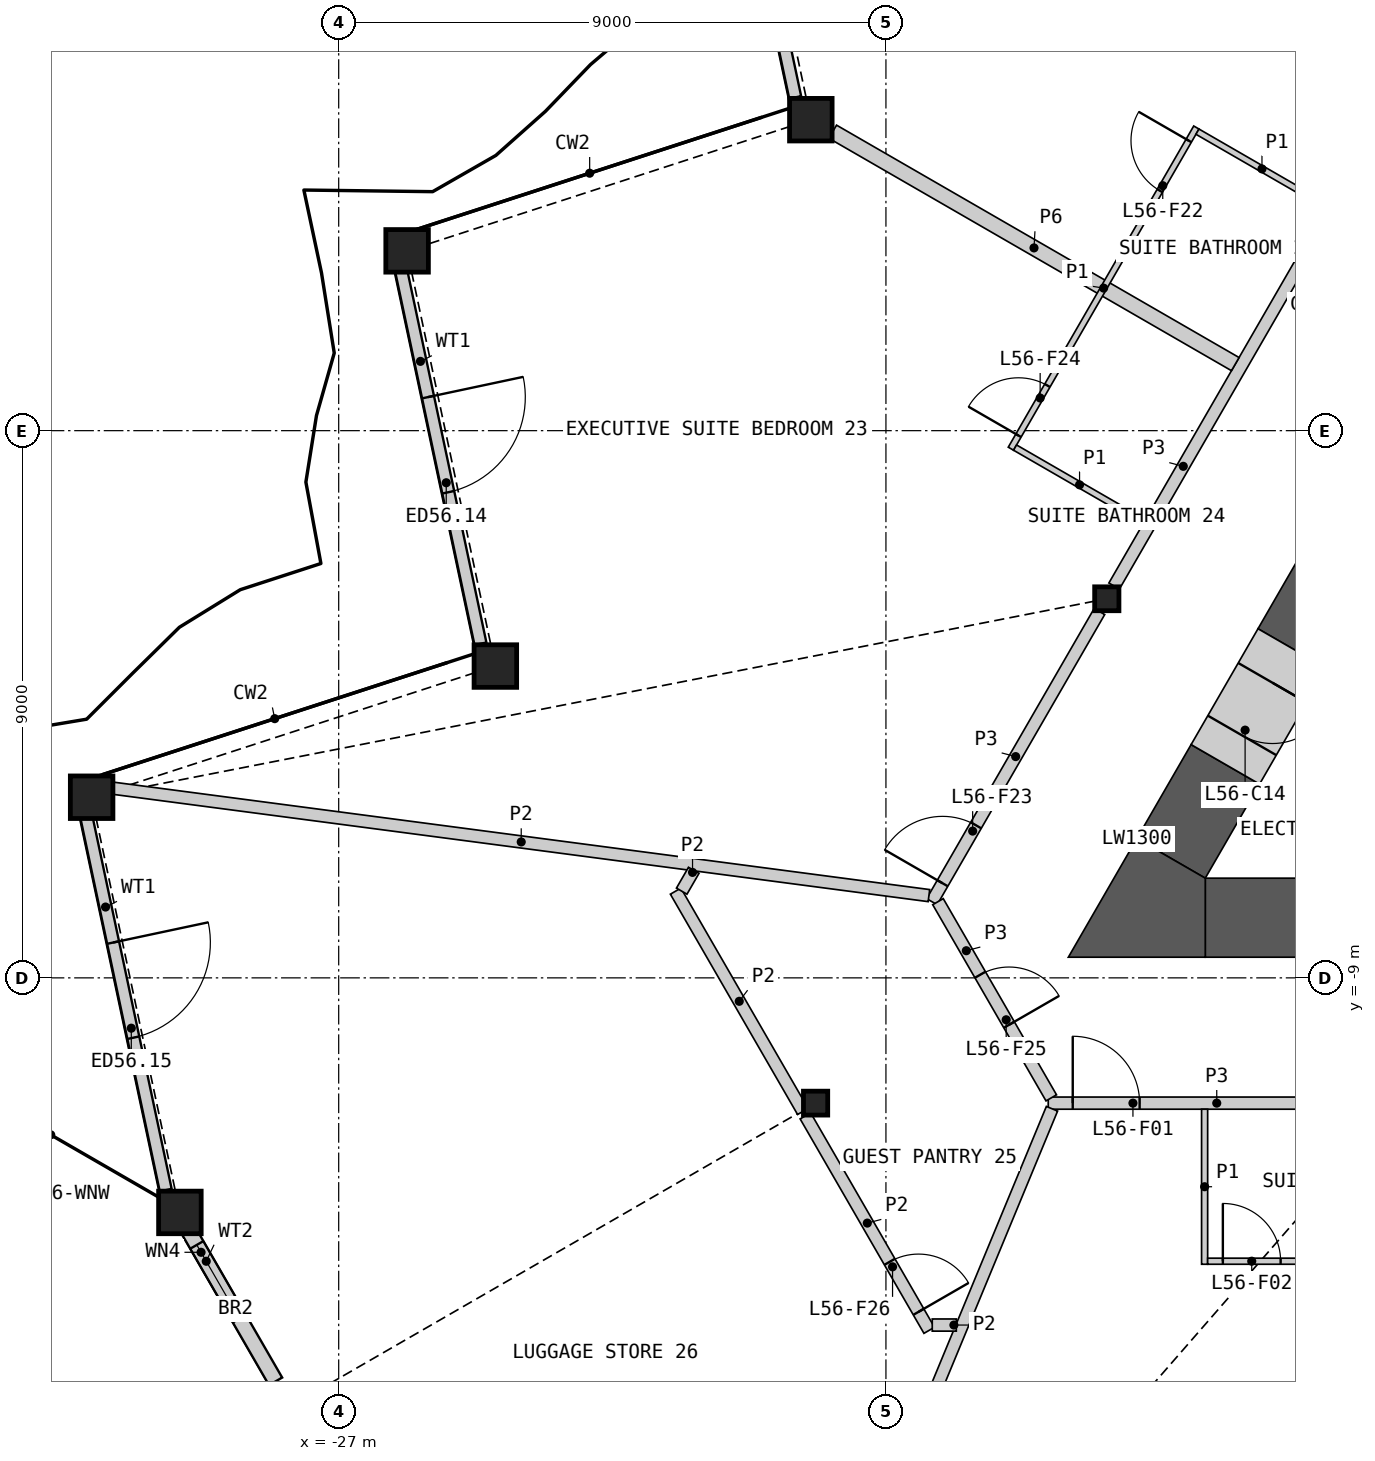
"""IFC4 building model, lengths in metres.
Left out: names, types, materials, properties, quantities, classifications, styles, units other than length and angle.
Written with IfcOpenShell. Run it as: python <this file> out.ifc"""

import sys

from ifc_helpers import new_model, si_unit, direction, frame, frame_2d, origin, origin_2d, place, context, subcontext, project, spatial, polyline, rectangle, hollow_rectangle, i_section, outline, extrude, element, fill, save


model = new_model("IFC4")
c1 = context("Model", 3, precision=1e-05, world=origin(), true_north=direction((0.0, 1.0)))
c2 = subcontext(c1, "Body", "Model", "MODEL_VIEW")
j1 = project(units=[si_unit("LENGTHUNIT", "METRE"), si_unit("PLANEANGLEUNIT", "RADIAN")], contexts=[c1])
p1 = place(None, origin())
s1 = spatial("IfcSite", under=j1, at=p1, CompositionType="ELEMENT")
p2 = place(p1, origin())
s2 = spatial("IfcBuilding", under=s1, at=p2, CompositionType="ELEMENT")
p3 = place(p2, frame((0.0, 0.0, 252.6)))
s3 = spatial("IfcBuildingStorey", under=s2, at=p3, CompositionType="ELEMENT", Elevation=252.6)
for number, where, z_axis, x_axis in (
    (1, (-19.235, 5.115, 0.0), (0.0, 0.0, 1.0), (1.0, 0.0, 0.0)),
    (2, (-25.875, 2.957, 0.0), (0.0, 0.0, 1.0), (1.0, 0.0, 0.0)),
    (3, (-24.423, -3.872, 0.0), (0.0, 0.0, 1.0), (1.0, 0.0, 0.0)),
    (4, (-31.063, -6.029, 0.0), (0.0, 0.0, 1.0), (1.0, 0.0, 0.0)),
    (5, (-29.612, -12.858, 0.0), (0.0, 0.0, 1.0), (1.0, 0.0, 0.0)),
):
    element("IfcColumn", number, at=place(p3, frame(where, z_axis=z_axis, x_axis=x_axis)), inside=s3, PredefinedType="COLUMN", context=c2, shape_type="SweptSolid", body=[
        extrude(hollow_rectangle(XDim=0.7, YDim=0.7, WallThickness=0.045, at=origin_2d()), origin(), (0.0, 0.0, 1.0), 3.6),
    ])
for number, where, z_axis, x_axis in (
    (6, (-14.368, -2.765, 0.0), (0.0, 0.0, 1.0), (1.0, 0.0, 0.0)),
    (7, (-19.157, -11.06, 0.0), (0.0, 0.0, 1.0), (1.0, 0.0, 0.0)),
):
    element("IfcColumn", number, at=place(p3, frame(where, z_axis=z_axis, x_axis=x_axis)), inside=s3, PredefinedType="COLUMN", context=c2, shape_type="SweptSolid", body=[
        extrude(i_section(OverallWidth=0.399, OverallDepth=0.393, WebThickness=0.023, FlangeThickness=0.037, at=origin_2d()), origin(), (0.0, 0.0, 1.0), 3.6),
    ])
p4 = place(p3, frame((-20.805, 11.659, 0.0), z_axis=(0.0, 0.0, 1.0), x_axis=(0.207913305093, -0.978147257608, 0.0)))
e8 = element("IfcWall", 8, at=p4, inside=s3, PredefinedType="SOLIDWALL", context=c2, shape_type="SweptSolid", body=[
    extrude(rectangle(XDim=6.316, YDim=0.2, at=frame_2d((3.158, 0.0))), origin(), (0.0, 0.0, 1.0), 2.701),
])
p5 = place(p4, frame((2.184, 0.0, 0.0)))
e9 = element("IfcOpeningElement", 9, at=p5, cuts=e8, PredefinedType="OPENING", context=c2, shape_type="SweptSolid", body=[
    extrude(rectangle(XDim=1.6, YDim=2.4, at=frame_2d((0.8, 1.2))), frame((0.0, 0.11, 0.0), z_axis=(0.0, -1.0, 0.0), x_axis=(1.0, 0.0, 0.0)), (0.0, 0.0, 1.0), 0.22),
])
p6 = place(p3, frame((-25.985, 2.688, 0.0), z_axis=(0.0, 0.0, 1.0), x_axis=(0.207906715746, -0.978148658205, 0.0)))
e10 = element("IfcWall", 10, at=p6, inside=s3, PredefinedType="SOLIDWALL", context=c2, shape_type="SweptSolid", body=[
    extrude(rectangle(XDim=6.332, YDim=0.2, at=frame_2d((3.166, 0.0))), origin(), (0.0, 0.0, 1.0), 2.701),
])
p7 = place(p6, frame((2.184, 0.0, 0.0)))
e11 = element("IfcOpeningElement", 11, at=p7, cuts=e10, PredefinedType="OPENING", context=c2, shape_type="SweptSolid", body=[
    extrude(rectangle(XDim=1.6, YDim=2.4, at=frame_2d((0.8, 1.2))), frame((0.0, 0.11, 0.0), z_axis=(0.0, -1.0, 0.0), x_axis=(1.0, 0.0, 0.0)), (0.0, 0.0, 1.0), 0.22),
])
p8 = place(p3, frame((-31.164, -6.283, 0.0), z_axis=(0.0, 0.0, 1.0), x_axis=(0.207900158502, -0.978150051932, 0.0)))
e12 = element("IfcWall", 12, at=p8, inside=s3, PredefinedType="SOLIDWALL", context=c2, shape_type="SweptSolid", body=[
    extrude(rectangle(XDim=6.347, YDim=0.2, at=frame_2d((3.174, 0.0))), origin(), (0.0, 0.0, 1.0), 2.701),
])
p9 = place(p8, frame((2.184, 0.0, 0.0)))
e13 = element("IfcOpeningElement", 13, at=p9, cuts=e12, PredefinedType="OPENING", context=c2, shape_type="SweptSolid", body=[
    extrude(rectangle(XDim=1.6, YDim=2.4, at=frame_2d((0.8, 1.2))), frame((0.0, 0.11, 0.0), z_axis=(0.0, -1.0, 0.0), x_axis=(1.0, 0.0, 0.0)), (0.0, 0.0, 1.0), 0.22),
])
p10 = place(p3, frame((-29.559, -13.002, 0.0), z_axis=(0.0, 0.0, 1.0), x_axis=(0.500023511883, -0.866011828767, 0.0)))
e14 = element("IfcWall", 14, at=p10, inside=s3, PredefinedType="SOLIDWALL", context=c2, shape_type="SweptSolid", body=[
    extrude(rectangle(XDim=3.042, YDim=0.25, at=frame_2d((1.521, 0.0))), origin(), (0.0, 0.0, 1.0), 2.701),
])
p11 = place(p10, frame((0.45, 0.0, 1.8)))
e15 = element("IfcOpeningElement", 15, at=p11, cuts=e14, PredefinedType="OPENING", context=c2, shape_type="SweptSolid", body=[
    extrude(rectangle(XDim=1.4, YDim=0.7, at=frame_2d((0.7, 0.35))), frame((0.0, 0.135, 0.0), z_axis=(0.0, -1.0, 0.0), x_axis=(1.0, 0.0, 0.0)), (0.0, 0.0, 1.0), 0.27),
])
p12 = place(p3, frame((-12.748, -8.01, 0.0), z_axis=(0.0, 0.0, 1.0), x_axis=(1.0, 0.0, 0.0)))
e16 = element("IfcWall", 16, at=p12, inside=s3, PredefinedType="SHEAR", context=c2, shape_type="SweptSolid", body=[
    extrude(rectangle(XDim=25.497, YDim=1.3, at=frame_2d((12.748, 0.0))), origin(), (0.0, 0.0, 1.0), 3.25),
])
p13 = place(p3, frame((-9.137, 0.195, 0.0), z_axis=(0.0, 0.0, 1.0), x_axis=(-0.499985697398, -0.866033661238, 0.0)))
e17 = element("IfcWall", 17, at=p13, inside=s3, PredefinedType="SHEAR", context=c2, shape_type="SweptSolid", body=[
    extrude(rectangle(XDim=4.362, YDim=1.3, at=frame_2d((2.181, 0.0))), origin(), (0.0, 0.0, 1.0), 3.25),
])
p14 = place(p3, frame((-12.418, -5.488, 0.0), z_axis=(0.0, 0.0, 1.0), x_axis=(-0.499931460552, -0.866064971437, 0.0)))
e18 = element("IfcWall", 18, at=p14, inside=s3, PredefinedType="SHEAR", context=c2, shape_type="SweptSolid", body=[
    extrude(rectangle(XDim=1.786, YDim=1.3, at=frame_2d((0.893, 0.0))), origin(), (0.0, 0.0, 1.0), 3.25),
])
p15 = place(p3, origin())
e19 = element("IfcWall", 19, at=p15, inside=s3, PredefinedType="SHEAR", context=c2, shape_type="SweptSolid", body=[
    extrude(outline(polyline([(-13.874, -6.71), (-12.748, -7.36), (-12.748, -8.66), (-15.0, -8.66), (-13.874, -6.71)])), origin(), (0.0, 0.0, 1.0), 3.25),
])
p16 = place(p3, frame((-11.318, -3.583, 0.0), z_axis=(0.0, 0.0, 1.0), x_axis=(-0.50002983664, -0.866008176907, 0.0)))
e20 = element("IfcWall", 20, at=p16, inside=s3, PredefinedType="SHEAR", context=c2, shape_type="SweptSolid", body=[
    extrude(rectangle(XDim=2.2, YDim=1.3, at=frame_2d((1.1, 0.0))), origin(), (0.0, 0.0, 1.0), 3.25),
])
p17 = place(p16, frame((0.65, 0.0, 0.0)))
e21 = element("IfcOpeningElement", 21, at=p17, cuts=e20, PredefinedType="OPENING", context=c2, shape_type="SweptSolid", body=[
    extrude(rectangle(XDim=1.0, YDim=2.1, at=frame_2d((0.5, 1.05))), frame((0.0, 0.66, 0.0), z_axis=(0.0, -1.0, 0.0), x_axis=(1.0, 0.0, 0.0)), (0.0, 0.0, 1.0), 1.32),
])
p18 = place(p3, frame((-14.247, -2.556, 0.0), z_axis=(0.0, 0.0, 1.0), x_axis=(0.49998193945, 0.866035830797, 0.0)))
e22 = element("IfcWall", 22, at=p18, inside=s3, PredefinedType="PARTITIONING", context=c2, shape_type="SweptSolid", body=[
    extrude(rectangle(XDim=9.094, YDim=0.2, at=frame_2d((4.547, 0.0))), origin(), (0.0, 0.0, 1.0), 3.25),
])
p19 = place(p3, frame((-18.875, 4.917, 0.0), z_axis=(0.0, 0.0, 1.0), x_axis=(0.866017519557, -0.500013655634, 0.0)))
e23 = element("IfcWall", 23, at=p19, inside=s3, PredefinedType="PARTITIONING", context=c2, shape_type="SweptSolid", body=[
    extrude(rectangle(XDim=7.644, YDim=0.25, at=frame_2d((3.822, 0.0))), origin(), (0.0, 0.0, 1.0), 2.404),
])
p20 = place(p3, frame((-15.331, -11.06, 0.0), z_axis=(0.0, 0.0, 1.0), x_axis=(1.0, 0.0, 0.0)))
e24 = element("IfcWall", 24, at=p20, inside=s3, PredefinedType="PARTITIONING", context=c2, shape_type="SweptSolid", body=[
    extrude(rectangle(XDim=5.543, YDim=0.2, at=frame_2d((2.771, 0.0))), origin(), (0.0, 0.0, 1.0), 3.25),
])
p21 = place(p20, frame((0.403, 0.0, 0.0)))
e25 = element("IfcOpeningElement", 25, at=p21, cuts=e24, PredefinedType="OPENING", context=c2, shape_type="SweptSolid", body=[
    extrude(rectangle(XDim=1.1, YDim=2.1, at=frame_2d((0.55, 1.05))), frame((0.0, 0.11, 0.0), z_axis=(0.0, -1.0, 0.0), x_axis=(1.0, 0.0, 0.0)), (0.0, 0.0, 1.0), 0.22),
])
p22 = place(p3, frame((-17.244, -7.747, 0.0), z_axis=(0.0, 0.0, 1.0), x_axis=(0.500017753321, 0.866015153657, 0.0)))
e26 = element("IfcWall", 26, at=p22, inside=s3, PredefinedType="PARTITIONING", context=c2, shape_type="SweptSolid", body=[
    extrude(rectangle(XDim=5.51, YDim=0.2, at=frame_2d((2.755, 0.0))), origin(), (0.0, 0.0, 1.0), 3.25),
])
p23 = place(p22, frame((0.35, 0.0, 0.0)))
e27 = element("IfcOpeningElement", 27, at=p23, cuts=e26, PredefinedType="OPENING", context=c2, shape_type="SweptSolid", body=[
    extrude(rectangle(XDim=1.1, YDim=2.1, at=frame_2d((0.55, 1.05))), frame((0.0, 0.11, 0.0), z_axis=(0.0, -1.0, 0.0), x_axis=(1.0, 0.0, 0.0)), (0.0, 0.0, 1.0), 0.22),
])
p24 = place(p3, frame((-17.144, -7.747, 0.0), z_axis=(0.0, 0.0, 1.0), x_axis=(0.499958791762, -0.866049194065, 0.0)))
e28 = element("IfcWall", 28, at=p24, inside=s3, PredefinedType="PARTITIONING", context=c2, shape_type="SweptSolid", body=[
    extrude(rectangle(XDim=3.726, YDim=0.2, at=frame_2d((1.863, 0.0))), origin(), (0.0, 0.0, 1.0), 3.25),
])
p25 = place(p24, frame((1.388, 0.0, 0.0)))
e29 = element("IfcOpeningElement", 29, at=p25, cuts=e28, PredefinedType="OPENING", context=c2, shape_type="SweptSolid", body=[
    extrude(rectangle(XDim=0.95, YDim=2.1, at=frame_2d((0.475, 1.05))), frame((0.0, 0.11, 0.0), z_axis=(0.0, -1.0, 0.0), x_axis=(1.0, 0.0, 0.0)), (0.0, 0.0, 1.0), 0.22),
])
p26 = place(p3, frame((-30.703, -5.882, 0.0), z_axis=(0.0, 0.0, 1.0), x_axis=(0.991445815272, -0.130518946443, 0.0)))
e30 = element("IfcWall", 30, at=p26, inside=s3, PredefinedType="PARTITIONING", context=c2, shape_type="SweptSolid", body=[
    extrude(rectangle(XDim=13.526, YDim=0.2, at=frame_2d((6.763, 0.0))), origin(), (0.0, 0.0, 1.0), 2.404),
])
p27 = place(p3, frame((-20.396, -23.53, 0.0), z_axis=(0.0, 0.0, 1.0), x_axis=(0.382692998932, 0.923875569851, 0.0)))
e31 = element("IfcWall", 31, at=p27, inside=s3, PredefinedType="PARTITIONING", context=c2, shape_type="SweptSolid", body=[
    extrude(rectangle(XDim=13.397, YDim=0.2, at=frame_2d((6.698, 0.0))), origin(), (0.0, 0.0, 1.0), 2.404),
])
p28 = place(p3, frame((-21.458, -7.574, 0.0), z_axis=(0.0, 0.0, 1.0), x_axis=(0.499973304129, -0.866040816104, 0.0)))
e32 = element("IfcWall", 32, at=p28, inside=s3, PredefinedType="PARTITIONING", context=c2, shape_type="SweptSolid", body=[
    extrude(rectangle(XDim=4.184, YDim=0.2, at=frame_2d((2.092, 0.0))), origin(), (0.0, 0.0, 1.0), 2.404),
])
p29 = place(p3, frame((-19.325, -11.27, 0.0), z_axis=(0.0, 0.0, 1.0), x_axis=(0.500000928893, -0.866024867487, 0.0)))
e33 = element("IfcWall", 33, at=p29, inside=s3, PredefinedType="PARTITIONING", context=c2, shape_type="SweptSolid", body=[
    extrude(rectangle(XDim=4.073, YDim=0.2, at=frame_2d((2.036, 0.0))), origin(), (0.0, 0.0, 1.0), 2.404),
])
p30 = place(p29, frame((2.772, 0.0, 0.0)))
e34 = element("IfcOpeningElement", 34, at=p30, cuts=e33, PredefinedType="OPENING", context=c2, shape_type="SweptSolid", body=[
    extrude(rectangle(XDim=0.95, YDim=2.1, at=frame_2d((0.475, 1.05))), frame((0.0, 0.11, 0.0), z_axis=(0.0, -1.0, 0.0), x_axis=(1.0, 0.0, 0.0)), (0.0, 0.0, 1.0), 0.22),
])
for number, where, z_axis, x_axis in (
    (35, (-17.238, -14.71, 0.0), (0.0, 0.0, 1.0), (1.0, 0.0, 0.0)),
    (36, (-21.359, -7.574, 0.0), (0.0, 0.0, 1.0), (0.5, 0.866, 0.0)),
):
    element("IfcWall", number, at=place(p3, frame(where, z_axis=z_axis, x_axis=x_axis)), inside=s3, PredefinedType="PARTITIONING", context=c2, shape_type="SweptSolid", body=[
        extrude(rectangle(XDim=0.396, YDim=0.2, at=frame_2d((0.198, 0.0))), origin(), (0.0, 0.0, 1.0), 2.404),
    ])
p31 = place(p3, frame((-15.945, -0.297, 0.0), z_axis=(0.0, 0.0, 1.0), x_axis=(0.499978833458, 0.866037623948, 0.0)))
e37 = element("IfcWall", 37, at=p31, inside=s3, PredefinedType="PARTITIONING", context=c2, shape_type="SweptSolid", body=[
    extrude(rectangle(XDim=6.1, YDim=0.1, at=frame_2d((3.05, 0.0))), origin(), (0.0, 0.0, 1.0), 2.404),
])
p32 = place(p31, frame((4.9, 0.0, 0.0)))
e38 = element("IfcOpeningElement", 38, at=p32, cuts=e37, PredefinedType="OPENING", context=c2, shape_type="SweptSolid", body=[
    extrude(rectangle(XDim=0.95, YDim=2.1, at=frame_2d((0.475, 1.05))), frame((0.0, 0.06, 0.0), z_axis=(0.0, -1.0, 0.0), x_axis=(1.0, 0.0, 0.0)), (0.0, 0.0, 1.0), 0.12),
])
p33 = place(p31, frame((0.25, 0.0, 0.0)))
e39 = element("IfcOpeningElement", 39, at=p33, cuts=e37, PredefinedType="OPENING", context=c2, shape_type="SweptSolid", body=[
    extrude(rectangle(XDim=0.95, YDim=2.1, at=frame_2d((0.475, 1.05))), frame((0.0, 0.06, 0.0), z_axis=(0.0, -1.0, 0.0), x_axis=(1.0, 0.0, 0.0)), (0.0, 0.0, 1.0), 0.12),
])
p34 = place(p3, frame((-12.877, 4.917, 0.0), z_axis=(0.0, 0.0, 1.0), x_axis=(0.866057815567, -0.499943856944, 0.0)))
e40 = element("IfcWall", 40, at=p34, inside=s3, PredefinedType="PARTITIONING", context=c2, shape_type="SweptSolid", body=[
    extrude(rectangle(XDim=2.45, YDim=0.1, at=frame_2d((1.225, 0.0))), origin(), (0.0, 0.0, 1.0), 2.404),
])
p35 = place(p3, frame((-12.759, -13.71, 0.0), z_axis=(0.0, 0.0, 1.0), x_axis=(0.0, 1.0, 0.0)))
e41 = element("IfcWall", 41, at=p35, inside=s3, PredefinedType="PARTITIONING", context=c2, shape_type="SweptSolid", body=[
    extrude(rectangle(XDim=2.55, YDim=0.1, at=frame_2d((1.275, 0.0))), origin(), (0.0, 0.0, 1.0), 2.404),
])
p36 = place(p3, frame((-15.877, -0.279, 0.0), z_axis=(0.0, 0.0, 1.0), x_axis=(0.866057815567, -0.499943856944, 0.0)))
e42 = element("IfcWall", 42, at=p36, inside=s3, PredefinedType="PARTITIONING", context=c2, shape_type="SweptSolid", body=[
    extrude(rectangle(XDim=2.45, YDim=0.1, at=frame_2d((1.225, 0.0))), origin(), (0.0, 0.0, 1.0), 2.404),
])
p37 = place(p3, frame((-12.709, -13.66, 0.0), z_axis=(0.0, 0.0, 1.0), x_axis=(1.0, 0.0, 0.0)))
e43 = element("IfcWall", 43, at=p37, inside=s3, PredefinedType="PARTITIONING", context=c2, shape_type="SweptSolid", body=[
    extrude(rectangle(XDim=2.25, YDim=0.1, at=frame_2d((1.125, 0.0))), origin(), (0.0, 0.0, 1.0), 2.404),
])
p38 = place(p37, frame((0.25, 0.0, 0.0)))
e44 = element("IfcOpeningElement", 44, at=p38, cuts=e43, PredefinedType="OPENING", context=c2, shape_type="SweptSolid", body=[
    extrude(rectangle(XDim=0.95, YDim=2.1, at=frame_2d((0.475, 1.05))), frame((0.0, 0.06, 0.0), z_axis=(0.0, -1.0, 0.0), x_axis=(1.0, 0.0, 0.0)), (0.0, 0.0, 1.0), 0.12),
])
p39 = place(p7, origin())
e45 = element("IfcDoor", 45, at=p39, inside=s3, OperationType="DOUBLE_DOOR_SINGLE_SWING", PredefinedType="DOOR", context=c2, shape_type="SweptSolid", body=[
    extrude(rectangle(XDim=1.6, YDim=2.4, at=frame_2d((0.8, 1.2))), frame((0.0, 0.025, 0.0), z_axis=(0.0, -1.0, 0.0), x_axis=(1.0, 0.0, 0.0)), (0.0, 0.0, 1.0), 0.05),
])
fill(e11, e45)
p40 = place(p9, origin())
e46 = element("IfcDoor", 46, at=p40, inside=s3, OperationType="DOUBLE_DOOR_SINGLE_SWING", PredefinedType="DOOR", context=c2, shape_type="SweptSolid", body=[
    extrude(rectangle(XDim=1.6, YDim=2.4, at=frame_2d((0.8, 1.2))), frame((0.0, 0.025, 0.0), z_axis=(0.0, -1.0, 0.0), x_axis=(1.0, 0.0, 0.0)), (0.0, 0.0, 1.0), 0.05),
])
fill(e13, e46)
p41 = place(p11, origin())
e47 = element("IfcWindow", 47, at=p41, inside=s3, PartitioningType="SINGLE_PANEL", PredefinedType="WINDOW", context=c2, shape_type="SweptSolid", body=[
    extrude(rectangle(XDim=1.4, YDim=0.7, at=frame_2d((0.7, 0.35))), frame((0.0, 0.03, 0.0), z_axis=(0.0, -1.0, 0.0), x_axis=(1.0, 0.0, 0.0)), (0.0, 0.0, 1.0), 0.06),
])
fill(e15, e47)
p42 = place(p17, origin())
e48 = element("IfcDoor", 48, at=p42, inside=s3, OperationType="SINGLE_SWING_LEFT", PredefinedType="DOOR", context=c2, shape_type="SweptSolid", body=[
    extrude(rectangle(XDim=1.0, YDim=2.1, at=frame_2d((0.5, 1.05))), frame((0.0, 0.405, 0.0), z_axis=(0.0, -1.0, 0.0), x_axis=(1.0, 0.0, 0.0)), (0.0, 0.0, 1.0), 0.05),
])
fill(e21, e48)
p43 = place(p21, origin())
e49 = element("IfcDoor", 49, at=p43, inside=s3, OperationType="SINGLE_SWING_LEFT", PredefinedType="DOOR", context=c2, shape_type="SweptSolid", body=[
    extrude(rectangle(XDim=1.1, YDim=2.1, at=frame_2d((0.55, 1.05))), frame((0.0, 0.025, 0.0), z_axis=(0.0, -1.0, 0.0), x_axis=(1.0, 0.0, 0.0)), (0.0, 0.0, 1.0), 0.05),
])
fill(e25, e49)
p44 = place(p38, origin())
e50 = element("IfcDoor", 50, at=p44, inside=s3, OperationType="SINGLE_SWING_LEFT", PredefinedType="DOOR", context=c2, shape_type="SweptSolid", body=[
    extrude(rectangle(XDim=0.95, YDim=2.1, at=frame_2d((0.475, 1.05))), frame((0.0, 0.025, 0.0), z_axis=(0.0, -1.0, 0.0), x_axis=(1.0, 0.0, 0.0)), (0.0, 0.0, 1.0), 0.05),
])
fill(e44, e50)
p45 = place(p32, origin())
e51 = element("IfcDoor", 51, at=p45, inside=s3, OperationType="SINGLE_SWING_RIGHT", PredefinedType="DOOR", context=c2, shape_type="SweptSolid", body=[
    extrude(rectangle(XDim=0.95, YDim=2.1, at=frame_2d((0.475, 1.05))), frame((0.0, 0.025, 0.0), z_axis=(0.0, -1.0, 0.0), x_axis=(1.0, 0.0, 0.0)), (0.0, 0.0, 1.0), 0.05),
])
fill(e38, e51)
p46 = place(p23, origin())
e52 = element("IfcDoor", 52, at=p46, inside=s3, OperationType="SINGLE_SWING_LEFT", PredefinedType="DOOR", context=c2, shape_type="SweptSolid", body=[
    extrude(rectangle(XDim=1.1, YDim=2.1, at=frame_2d((0.55, 1.05))), frame((0.0, 0.025, 0.0), z_axis=(0.0, -1.0, 0.0), x_axis=(1.0, 0.0, 0.0)), (0.0, 0.0, 1.0), 0.05),
])
fill(e27, e52)
p47 = place(p33, origin())
e53 = element("IfcDoor", 53, at=p47, inside=s3, OperationType="SINGLE_SWING_LEFT", PredefinedType="DOOR", context=c2, shape_type="SweptSolid", body=[
    extrude(rectangle(XDim=0.95, YDim=2.1, at=frame_2d((0.475, 1.05))), frame((0.0, 0.025, 0.0), z_axis=(0.0, -1.0, 0.0), x_axis=(1.0, 0.0, 0.0)), (0.0, 0.0, 1.0), 0.05),
])
fill(e39, e53)
p48 = place(p25, origin())
e54 = element("IfcDoor", 54, at=p48, inside=s3, OperationType="SINGLE_SWING_RIGHT", PredefinedType="DOOR", context=c2, shape_type="SweptSolid", body=[
    extrude(rectangle(XDim=0.95, YDim=2.1, at=frame_2d((0.475, 1.05))), frame((0.0, 0.025, 0.0), z_axis=(0.0, -1.0, 0.0), x_axis=(1.0, 0.0, 0.0)), (0.0, 0.0, 1.0), 0.05),
])
fill(e29, e54)
p49 = place(p30, origin())
e55 = element("IfcDoor", 55, at=p49, inside=s3, OperationType="SINGLE_SWING_RIGHT", PredefinedType="DOOR", context=c2, shape_type="SweptSolid", body=[
    extrude(rectangle(XDim=0.95, YDim=2.1, at=frame_2d((0.475, 1.05))), frame((0.0, 0.025, 0.0), z_axis=(0.0, -1.0, 0.0), x_axis=(1.0, 0.0, 0.0)), (0.0, 0.0, 1.0), 0.05),
])
fill(e34, e55)
save(model, sys.argv[1])
